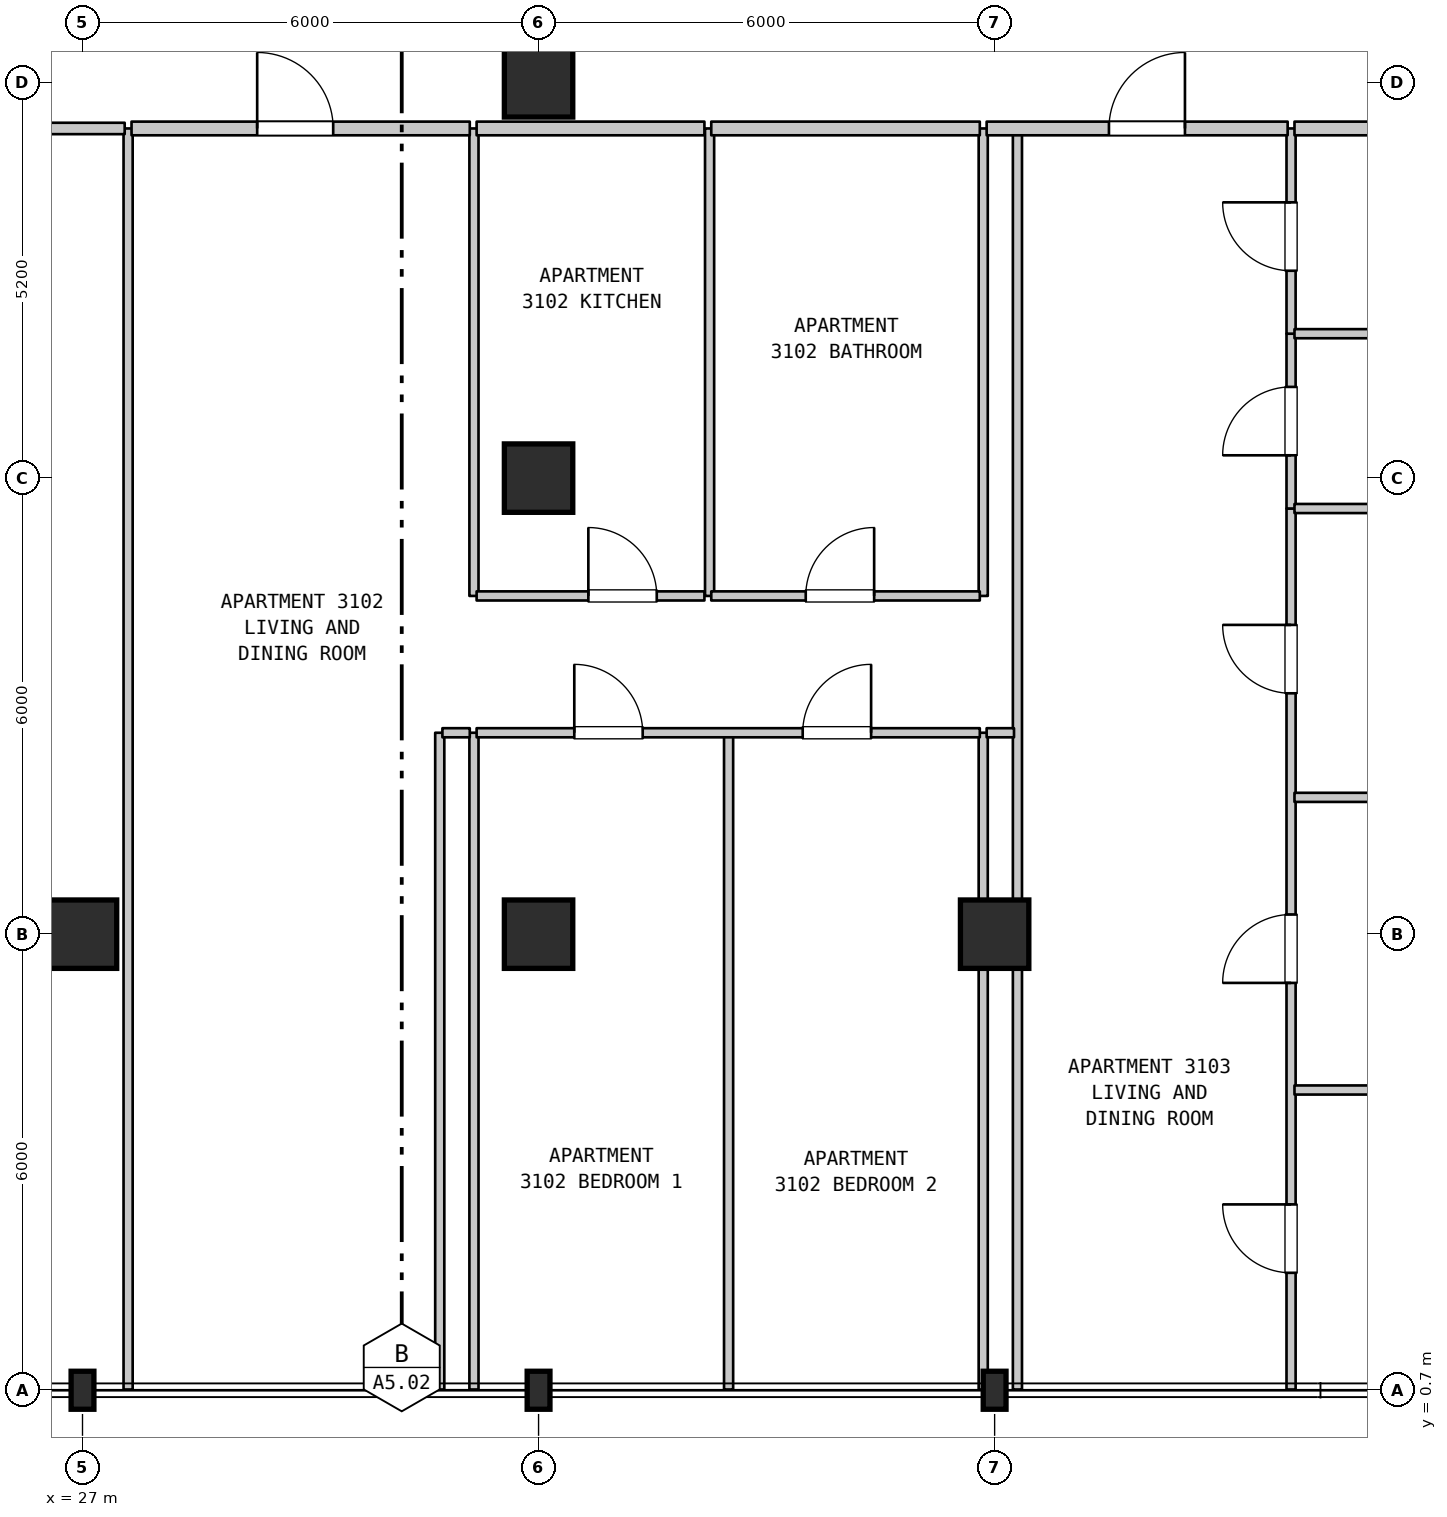
"""IFC4 building model, lengths in metres.
Left out: names, types, materials, properties, quantities, classifications, styles, units other than length and angle.
Written with IfcOpenShell. Run it as: python <this file> out.ifc"""

import sys

from ifc_helpers import new_model, si_unit, direction, frame, frame_2d, origin, origin_2d, place, context, subcontext, project, spatial, rectangle, i_section, extrude, element, fill, save


model = new_model("IFC4")
c1 = context("Model", 3, precision=1e-05, world=origin(), true_north=direction((0.0, 1.0)))
c2 = subcontext(c1, "Body", "Model", "MODEL_VIEW")
j1 = project(units=[si_unit("LENGTHUNIT", "METRE"), si_unit("PLANEANGLEUNIT", "RADIAN")], contexts=[c1])
p1 = place(None, origin())
s1 = spatial("IfcSite", under=j1, at=p1, CompositionType="ELEMENT")
p2 = place(p1, origin())
s2 = spatial("IfcBuilding", under=s1, at=p2, CompositionType="ELEMENT")
p3 = place(p2, frame((0.0, 0.0, 129.8)))
s3 = spatial("IfcBuildingStorey", under=s2, at=p3, CompositionType="ELEMENT", Elevation=129.8)
p4 = place(p3, frame((27.0, 0.7, 0.0), z_axis=(0.0, 0.0, 1.0), x_axis=(1.0, 0.0, 0.0)))
e1 = element("IfcColumn", 1, at=p4, inside=s3, PredefinedType="COLUMN", context=c2, shape_type="SweptSolid", body=[
    extrude(i_section(OverallWidth=0.3, OverallDepth=0.5, WebThickness=0.014, FlangeThickness=0.028, FilletRadius=0.027, at=origin_2d()), origin(), (0.0, 0.0, 1.0), 3.7),
])
p5 = place(p3, frame((27.0, 6.7, 0.0), z_axis=(0.0, 0.0, 1.0), x_axis=(1.0, 0.0, 0.0)))
e2 = element("IfcColumn", 2, at=p5, inside=s3, PredefinedType="COLUMN", context=c2, shape_type="SweptSolid", body=[
    extrude(rectangle(XDim=0.9, YDim=0.9, at=origin_2d()), origin(), (0.0, 0.0, 1.0), 3.7),
])
p6 = place(p3, frame((33.0, 0.7, 0.0), z_axis=(0.0, 0.0, 1.0), x_axis=(1.0, 0.0, 0.0)))
e3 = element("IfcColumn", 3, at=p6, inside=s3, PredefinedType="COLUMN", context=c2, shape_type="SweptSolid", body=[
    extrude(i_section(OverallWidth=0.3, OverallDepth=0.5, WebThickness=0.014, FlangeThickness=0.028, FilletRadius=0.027, at=origin_2d()), origin(), (0.0, 0.0, 1.0), 3.7),
])
for number, where, z_axis, x_axis in (
    (4, (33.0, 6.7, 0.0), (0.0, 0.0, 1.0), (1.0, 0.0, 0.0)),
    (5, (33.0, 12.7, 0.0), (0.0, 0.0, 1.0), (1.0, 0.0, 0.0)),
    (6, (33.0, 17.9, 0.0), (0.0, 0.0, 1.0), (1.0, 0.0, 0.0)),
):
    element("IfcColumn", number, at=place(p3, frame(where, z_axis=z_axis, x_axis=x_axis)), inside=s3, PredefinedType="COLUMN", context=c2, shape_type="SweptSolid", body=[
        extrude(rectangle(XDim=0.9, YDim=0.9, at=origin_2d()), origin(), (0.0, 0.0, 1.0), 3.7),
    ])
p7 = place(p3, frame((39.0, 0.7, 0.0), z_axis=(0.0, 0.0, 1.0), x_axis=(1.0, 0.0, 0.0)))
e7 = element("IfcColumn", 7, at=p7, inside=s3, PredefinedType="COLUMN", context=c2, shape_type="SweptSolid", body=[
    extrude(i_section(OverallWidth=0.3, OverallDepth=0.5, WebThickness=0.014, FlangeThickness=0.028, FilletRadius=0.027, at=origin_2d()), origin(), (0.0, 0.0, 1.0), 3.7),
])
p8 = place(p3, frame((39.0, 6.7, 0.0), z_axis=(0.0, 0.0, 1.0), x_axis=(1.0, 0.0, 0.0)))
e8 = element("IfcColumn", 8, at=p8, inside=s3, PredefinedType="COLUMN", context=c2, shape_type="SweptSolid", body=[
    extrude(rectangle(XDim=0.9, YDim=0.9, at=origin_2d()), origin(), (0.0, 0.0, 1.0), 3.7),
])
p9 = place(p3, frame((27.6, 0.71, 0.0), z_axis=(0.0, 0.0, 1.0), x_axis=(0.0, 1.0, 0.0)))
e9 = element("IfcWall", 9, at=p9, inside=s3, PredefinedType="PARTITIONING", context=c2, shape_type="SweptSolid", body=[
    extrude(rectangle(XDim=16.59, YDim=0.12, at=frame_2d((8.295, 0.0))), origin(), (0.0, 0.0, 1.0), 3.385),
])
for number, where, z_axis, x_axis in (
    (10, (31.7, 0.71, 0.0), (0.0, 0.0, 1.0), (0.0, 1.0, 0.0)),
    (11, (32.15, 0.71, 0.0), (0.0, 0.0, 1.0), (0.0, 1.0, 0.0)),
):
    element("IfcWall", number, at=place(p3, frame(where, z_axis=z_axis, x_axis=x_axis)), inside=s3, PredefinedType="PARTITIONING", context=c2, shape_type="SweptSolid", body=[
        extrude(rectangle(XDim=8.64, YDim=0.12, at=frame_2d((4.32, 0.0))), origin(), (0.0, 0.0, 1.0), 3.385),
    ])
for number, where, z_axis, x_axis in (
    (12, (32.15, 11.15, 0.0), (0.0, 0.0, 1.0), (0.0, 1.0, 0.0)),
    (13, (35.25, 11.15, 0.0), (0.0, 0.0, 1.0), (0.0, 1.0, 0.0)),
):
    element("IfcWall", number, at=place(p3, frame(where, z_axis=z_axis, x_axis=x_axis)), inside=s3, PredefinedType="PARTITIONING", context=c2, shape_type="SweptSolid", body=[
        extrude(rectangle(XDim=6.15, YDim=0.12, at=frame_2d((3.075, 0.0))), origin(), (0.0, 0.0, 1.0), 3.385),
    ])
for number, where, z_axis, x_axis in (
    (14, (35.5, 0.71, 0.0), (0.0, 0.0, 1.0), (0.0, 1.0, 0.0)),
    (15, (38.85, 0.71, 0.0), (0.0, 0.0, 1.0), (0.0, 1.0, 0.0)),
):
    element("IfcWall", number, at=place(p3, frame(where, z_axis=z_axis, x_axis=x_axis)), inside=s3, PredefinedType="PARTITIONING", context=c2, shape_type="SweptSolid", body=[
        extrude(rectangle(XDim=8.64, YDim=0.12, at=frame_2d((4.32, 0.0))), origin(), (0.0, 0.0, 1.0), 3.385),
    ])
p10 = place(p3, frame((38.85, 11.15, 0.0), z_axis=(0.0, 0.0, 1.0), x_axis=(0.0, 1.0, 0.0)))
e16 = element("IfcWall", 16, at=p10, inside=s3, PredefinedType="PARTITIONING", context=c2, shape_type="SweptSolid", body=[
    extrude(rectangle(XDim=6.15, YDim=0.12, at=frame_2d((3.075, 0.0))), origin(), (0.0, 0.0, 1.0), 3.385),
])
p11 = place(p3, frame((39.3, 0.71, 0.0), z_axis=(0.0, 0.0, 1.0), x_axis=(0.0, 1.0, 0.0)))
e17 = element("IfcWall", 17, at=p11, inside=s3, PredefinedType="PARTITIONING", context=c2, shape_type="SweptSolid", body=[
    extrude(rectangle(XDim=16.59, YDim=0.12, at=frame_2d((8.295, 0.0))), origin(), (0.0, 0.0, 1.0), 3.385),
])
p12 = place(p3, frame((42.9, 0.71, 0.0), z_axis=(0.0, 0.0, 1.0), x_axis=(0.0, 1.0, 0.0)))
e18 = element("IfcWall", 18, at=p12, inside=s3, PredefinedType="PARTITIONING", context=c2, shape_type="SweptSolid", body=[
    extrude(rectangle(XDim=11.59, YDim=0.12, at=frame_2d((5.795, 0.0))), origin(), (0.0, 0.0, 1.0), 3.385),
])
p13 = place(p12, frame((1.535, 0.0, 0.0)))
e19 = element("IfcOpeningElement", 19, at=p13, cuts=e18, PredefinedType="OPENING", context=c2, shape_type="SweptSolid", body=[
    extrude(rectangle(XDim=0.9, YDim=2.15, at=frame_2d((0.45, 1.075))), frame((0.0, 0.07, 0.0), z_axis=(0.0, -1.0, 0.0), x_axis=(1.0, 0.0, 0.0)), (0.0, 0.0, 1.0), 0.14),
])
p14 = place(p12, frame((5.349, 0.0, 0.0)))
e20 = element("IfcOpeningElement", 20, at=p14, cuts=e18, PredefinedType="OPENING", context=c2, shape_type="SweptSolid", body=[
    extrude(rectangle(XDim=0.9, YDim=2.15, at=frame_2d((0.45, 1.075))), frame((0.0, 0.07, 0.0), z_axis=(0.0, -1.0, 0.0), x_axis=(1.0, 0.0, 0.0)), (0.0, 0.0, 1.0), 0.14),
])
p15 = place(p12, frame((9.159, 0.0, 0.0)))
e21 = element("IfcOpeningElement", 21, at=p15, cuts=e18, PredefinedType="OPENING", context=c2, shape_type="SweptSolid", body=[
    extrude(rectangle(XDim=0.9, YDim=2.15, at=frame_2d((0.45, 1.075))), frame((0.0, 0.07, 0.0), z_axis=(0.0, -1.0, 0.0), x_axis=(1.0, 0.0, 0.0)), (0.0, 0.0, 1.0), 0.14),
])
p16 = place(p3, frame((42.9, 12.3, 0.0), z_axis=(0.0, 0.0, 1.0), x_axis=(0.0, 1.0, 0.0)))
e22 = element("IfcWall", 22, at=p16, inside=s3, PredefinedType="PARTITIONING", context=c2, shape_type="SweptSolid", body=[
    extrude(rectangle(XDim=2.3, YDim=0.12, at=frame_2d((1.15, 0.0))), origin(), (0.0, 0.0, 1.0), 3.385),
])
p17 = place(p16, frame((0.7, 0.0, 0.0)))
e23 = element("IfcOpeningElement", 23, at=p17, cuts=e22, PredefinedType="OPENING", context=c2, shape_type="SweptSolid", body=[
    extrude(rectangle(XDim=0.9, YDim=2.15, at=frame_2d((0.45, 1.075))), frame((0.0, 0.07, 0.0), z_axis=(0.0, -1.0, 0.0), x_axis=(1.0, 0.0, 0.0)), (0.0, 0.0, 1.0), 0.14),
])
p18 = place(p3, frame((42.9, 14.6, 0.0), z_axis=(0.0, 0.0, 1.0), x_axis=(0.0, 1.0, 0.0)))
e24 = element("IfcWall", 24, at=p18, inside=s3, PredefinedType="PARTITIONING", context=c2, shape_type="SweptSolid", body=[
    extrude(rectangle(XDim=2.7, YDim=0.12, at=frame_2d((1.35, 0.0))), origin(), (0.0, 0.0, 1.0), 3.385),
])
p19 = place(p18, frame((0.828, 0.0, 0.0)))
e25 = element("IfcOpeningElement", 25, at=p19, cuts=e24, PredefinedType="OPENING", context=c2, shape_type="SweptSolid", body=[
    extrude(rectangle(XDim=0.9, YDim=2.1, at=frame_2d((0.45, 1.05))), frame((0.0, 0.07, 0.0), z_axis=(0.0, -1.0, 0.0), x_axis=(1.0, 0.0, 0.0)), (0.0, 0.0, 1.0), 0.14),
])
for number, where, z_axis, x_axis in (
    (26, (42.945, 4.65, 0.0), (0.0, 0.0, 1.0), (1.0, 0.0, 0.0)),
    (27, (42.945, 8.5, 0.0), (0.0, 0.0, 1.0), (1.0, 0.0, 0.0)),
):
    element("IfcWall", number, at=place(p3, frame(where, z_axis=z_axis, x_axis=x_axis)), inside=s3, PredefinedType="PARTITIONING", context=c2, shape_type="SweptSolid", body=[
        extrude(rectangle(XDim=6.25, YDim=0.12, at=frame_2d((3.125, 0.0))), origin(), (0.0, 0.0, 1.0), 3.385),
    ])
p20 = place(p3, frame((31.735, 9.35, 0.0), z_axis=(0.0, 0.0, 1.0), x_axis=(1.0, 0.0, 0.0)))
e28 = element("IfcWall", 28, at=p20, inside=s3, PredefinedType="PARTITIONING", context=c2, shape_type="SweptSolid", body=[
    extrude(rectangle(XDim=0.36, YDim=0.12, at=frame_2d((0.18, 0.0))), origin(), (0.0, 0.0, 1.0), 3.385),
])
p21 = place(p3, frame((32.185, 9.35, 0.0), z_axis=(0.0, 0.0, 1.0), x_axis=(1.0, 0.0, 0.0)))
e29 = element("IfcWall", 29, at=p21, inside=s3, PredefinedType="PARTITIONING", context=c2, shape_type="SweptSolid", body=[
    extrude(rectangle(XDim=6.62, YDim=0.12, at=frame_2d((3.31, 0.0))), origin(), (0.0, 0.0, 1.0), 3.385),
])
p22 = place(p21, frame((1.285, 0.0, 0.0)))
e30 = element("IfcOpeningElement", 30, at=p22, cuts=e29, PredefinedType="OPENING", context=c2, shape_type="SweptSolid", body=[
    extrude(rectangle(XDim=0.9, YDim=2.15, at=frame_2d((0.45, 1.075))), frame((0.0, 0.07, 0.0), z_axis=(0.0, -1.0, 0.0), x_axis=(1.0, 0.0, 0.0)), (0.0, 0.0, 1.0), 0.14),
])
p23 = place(p21, frame((4.29, 0.0, 0.0)))
e31 = element("IfcOpeningElement", 31, at=p23, cuts=e29, PredefinedType="OPENING", context=c2, shape_type="SweptSolid", body=[
    extrude(rectangle(XDim=0.9, YDim=2.15, at=frame_2d((0.45, 1.075))), frame((0.0, 0.07, 0.0), z_axis=(0.0, -1.0, 0.0), x_axis=(1.0, 0.0, 0.0)), (0.0, 0.0, 1.0), 0.14),
])
p24 = place(p3, frame((38.895, 9.35, 0.0), z_axis=(0.0, 0.0, 1.0), x_axis=(1.0, 0.0, 0.0)))
e32 = element("IfcWall", 32, at=p24, inside=s3, PredefinedType="PARTITIONING", context=c2, shape_type="SweptSolid", body=[
    extrude(rectangle(XDim=0.36, YDim=0.12, at=frame_2d((0.18, 0.0))), origin(), (0.0, 0.0, 1.0), 3.385),
])
p25 = place(p3, frame((32.185, 11.15, 0.0), z_axis=(0.0, 0.0, 1.0), x_axis=(1.0, 0.0, 0.0)))
e33 = element("IfcWall", 33, at=p25, inside=s3, PredefinedType="PARTITIONING", context=c2, shape_type="SweptSolid", body=[
    extrude(rectangle(XDim=2.997, YDim=0.12, at=frame_2d((1.499, 0.0))), origin(), (0.0, 0.0, 1.0), 3.385),
])
p26 = place(p25, frame((1.47, 0.0, 0.0)))
e34 = element("IfcOpeningElement", 34, at=p26, cuts=e33, PredefinedType="OPENING", context=c2, shape_type="SweptSolid", body=[
    extrude(rectangle(XDim=0.9, YDim=2.15, at=frame_2d((0.45, 1.075))), frame((0.0, 0.07, 0.0), z_axis=(0.0, -1.0, 0.0), x_axis=(1.0, 0.0, 0.0)), (0.0, 0.0, 1.0), 0.14),
])
p27 = place(p3, frame((35.272, 11.15, 0.0), z_axis=(0.0, 0.0, 1.0), x_axis=(1.0, 0.0, 0.0)))
e35 = element("IfcWall", 35, at=p27, inside=s3, PredefinedType="PARTITIONING", context=c2, shape_type="SweptSolid", body=[
    extrude(rectangle(XDim=3.533, YDim=0.12, at=frame_2d((1.767, 0.0))), origin(), (0.0, 0.0, 1.0), 3.385),
])
p28 = place(p27, frame((1.243, 0.0, 0.0)))
e36 = element("IfcOpeningElement", 36, at=p28, cuts=e35, PredefinedType="OPENING", context=c2, shape_type="SweptSolid", body=[
    extrude(rectangle(XDim=0.9, YDim=2.1, at=frame_2d((0.45, 1.05))), frame((0.0, 0.07, 0.0), z_axis=(0.0, -1.0, 0.0), x_axis=(1.0, 0.0, 0.0)), (0.0, 0.0, 1.0), 0.14),
])
for number, where, z_axis, x_axis in (
    (37, (42.945, 12.3, 0.0), (0.0, 0.0, 1.0), (1.0, 0.0, 0.0)),
    (38, (42.945, 14.6, 0.0), (0.0, 0.0, 1.0), (1.0, 0.0, 0.0)),
):
    element("IfcWall", number, at=place(p3, frame(where, z_axis=z_axis, x_axis=x_axis)), inside=s3, PredefinedType="PARTITIONING", context=c2, shape_type="SweptSolid", body=[
        extrude(rectangle(XDim=6.25, YDim=0.12, at=frame_2d((3.125, 0.0))), origin(), (0.0, 0.0, 1.0), 3.385),
    ])
p29 = place(p3, frame((21.045, 17.3, 0.0), z_axis=(0.0, 0.0, 1.0), x_axis=(1.0, 0.0, 0.0)))
e39 = element("IfcWall", 39, at=p29, inside=s3, PredefinedType="STANDARD", context=c2, shape_type="SweptSolid", body=[
    extrude(rectangle(XDim=6.51, YDim=0.15, at=frame_2d((3.255, 0.0))), origin(), (0.0, 0.0, 1.0), 3.385),
])
p30 = place(p29, frame((2.755, 0.0, 0.0)))
e40 = element("IfcOpeningElement", 40, at=p30, cuts=e39, PredefinedType="OPENING", context=c2, shape_type="SweptSolid", body=[
    extrude(rectangle(XDim=1.0, YDim=2.15, at=frame_2d((0.5, 1.075))), frame((0.0, 0.085, 0.0), z_axis=(0.0, -1.0, 0.0), x_axis=(1.0, 0.0, 0.0)), (0.0, 0.0, 1.0), 0.17),
])
p31 = place(p3, frame((27.645, 17.3, 0.0), z_axis=(0.0, 0.0, 1.0), x_axis=(1.0, 0.0, 0.0)))
e41 = element("IfcWall", 41, at=p31, inside=s3, PredefinedType="STANDARD", context=c2, shape_type="SweptSolid", body=[
    extrude(rectangle(XDim=4.45, YDim=0.18, at=frame_2d((2.225, 0.0))), origin(), (0.0, 0.0, 1.0), 3.385),
])
p32 = place(p31, frame((1.653, 0.0, 0.0)))
e42 = element("IfcOpeningElement", 42, at=p32, cuts=e41, PredefinedType="OPENING", context=c2, shape_type="SweptSolid", body=[
    extrude(rectangle(XDim=1.0, YDim=2.15, at=frame_2d((0.5, 1.075))), frame((0.0, 0.1, 0.0), z_axis=(0.0, -1.0, 0.0), x_axis=(1.0, 0.0, 0.0)), (0.0, 0.0, 1.0), 0.2),
])
p33 = place(p3, frame((32.185, 17.3, 0.0), z_axis=(0.0, 0.0, 1.0), x_axis=(1.0, 0.0, 0.0)))
e43 = element("IfcWall", 43, at=p33, inside=s3, PredefinedType="STANDARD", context=c2, shape_type="SweptSolid", body=[
    extrude(rectangle(XDim=2.997, YDim=0.18, at=frame_2d((1.499, 0.0))), origin(), (0.0, 0.0, 1.0), 3.385),
])
p34 = place(p3, frame((35.272, 17.3, 0.0), z_axis=(0.0, 0.0, 1.0), x_axis=(1.0, 0.0, 0.0)))
e44 = element("IfcWall", 44, at=p34, inside=s3, PredefinedType="STANDARD", context=c2, shape_type="SweptSolid", body=[
    extrude(rectangle(XDim=3.533, YDim=0.18, at=frame_2d((1.767, 0.0))), origin(), (0.0, 0.0, 1.0), 3.385),
])
p35 = place(p3, frame((38.895, 17.3, 0.0), z_axis=(0.0, 0.0, 1.0), x_axis=(1.0, 0.0, 0.0)))
e45 = element("IfcWall", 45, at=p35, inside=s3, PredefinedType="STANDARD", context=c2, shape_type="SweptSolid", body=[
    extrude(rectangle(XDim=3.96, YDim=0.18, at=frame_2d((1.98, 0.0))), origin(), (0.0, 0.0, 1.0), 3.385),
])
p36 = place(p35, frame((1.609, 0.0, 0.0)))
e46 = element("IfcOpeningElement", 46, at=p36, cuts=e45, PredefinedType="OPENING", context=c2, shape_type="SweptSolid", body=[
    extrude(rectangle(XDim=1.0, YDim=2.15, at=frame_2d((0.5, 1.075))), frame((0.0, 0.1, 0.0), z_axis=(0.0, -1.0, 0.0), x_axis=(1.0, 0.0, 0.0)), (0.0, 0.0, 1.0), 0.2),
])
p37 = place(p3, frame((42.945, 17.3, 0.0), z_axis=(0.0, 0.0, 1.0), x_axis=(1.0, 0.0, 0.0)))
e47 = element("IfcWall", 47, at=p37, inside=s3, PredefinedType="STANDARD", context=c2, shape_type="SweptSolid", body=[
    extrude(rectangle(XDim=6.25, YDim=0.18, at=frame_2d((3.125, 0.0))), origin(), (0.0, 0.0, 1.0), 3.385),
])
p38 = place(p13, origin())
e48 = element("IfcDoor", 48, at=p38, inside=s3, OperationType="SINGLE_SWING_RIGHT", PredefinedType="DOOR", context=c2, shape_type="SweptSolid", body=[
    extrude(rectangle(XDim=0.9, YDim=2.15, at=frame_2d((0.45, 1.075))), frame((0.0, 0.025, 0.0), z_axis=(0.0, -1.0, 0.0), x_axis=(1.0, 0.0, 0.0)), (0.0, 0.0, 1.0), 0.05),
])
fill(e19, e48)
p39 = place(p14, origin())
e49 = element("IfcDoor", 49, at=p39, inside=s3, OperationType="SINGLE_SWING_LEFT", PredefinedType="DOOR", context=c2, shape_type="SweptSolid", body=[
    extrude(rectangle(XDim=0.9, YDim=2.15, at=frame_2d((0.45, 1.075))), frame((0.0, 0.025, 0.0), z_axis=(0.0, -1.0, 0.0), x_axis=(1.0, 0.0, 0.0)), (0.0, 0.0, 1.0), 0.05),
])
fill(e20, e49)
p40 = place(p15, origin())
e50 = element("IfcDoor", 50, at=p40, inside=s3, OperationType="SINGLE_SWING_RIGHT", PredefinedType="DOOR", context=c2, shape_type="SweptSolid", body=[
    extrude(rectangle(XDim=0.9, YDim=2.15, at=frame_2d((0.45, 1.075))), frame((0.0, 0.025, 0.0), z_axis=(0.0, -1.0, 0.0), x_axis=(1.0, 0.0, 0.0)), (0.0, 0.0, 1.0), 0.05),
])
fill(e21, e50)
p41 = place(p17, origin())
e51 = element("IfcDoor", 51, at=p41, inside=s3, OperationType="SINGLE_SWING_LEFT", PredefinedType="DOOR", context=c2, shape_type="SweptSolid", body=[
    extrude(rectangle(XDim=0.9, YDim=2.15, at=frame_2d((0.45, 1.075))), frame((0.0, 0.025, 0.0), z_axis=(0.0, -1.0, 0.0), x_axis=(1.0, 0.0, 0.0)), (0.0, 0.0, 1.0), 0.05),
])
fill(e23, e51)
p42 = place(p19, origin())
e52 = element("IfcDoor", 52, at=p42, inside=s3, OperationType="SINGLE_SWING_RIGHT", PredefinedType="DOOR", context=c2, shape_type="SweptSolid", body=[
    extrude(rectangle(XDim=0.9, YDim=2.1, at=frame_2d((0.45, 1.05))), frame((0.0, 0.025, 0.0), z_axis=(0.0, -1.0, 0.0), x_axis=(1.0, 0.0, 0.0)), (0.0, 0.0, 1.0), 0.05),
])
fill(e25, e52)
p43 = place(p22, origin())
e53 = element("IfcDoor", 53, at=p43, inside=s3, OperationType="SINGLE_SWING_LEFT", PredefinedType="DOOR", context=c2, shape_type="SweptSolid", body=[
    extrude(rectangle(XDim=0.9, YDim=2.15, at=frame_2d((0.45, 1.075))), frame((0.0, 0.025, 0.0), z_axis=(0.0, -1.0, 0.0), x_axis=(1.0, 0.0, 0.0)), (0.0, 0.0, 1.0), 0.05),
])
fill(e30, e53)
p44 = place(p23, origin())
e54 = element("IfcDoor", 54, at=p44, inside=s3, OperationType="SINGLE_SWING_RIGHT", PredefinedType="DOOR", context=c2, shape_type="SweptSolid", body=[
    extrude(rectangle(XDim=0.9, YDim=2.15, at=frame_2d((0.45, 1.075))), frame((0.0, 0.025, 0.0), z_axis=(0.0, -1.0, 0.0), x_axis=(1.0, 0.0, 0.0)), (0.0, 0.0, 1.0), 0.05),
])
fill(e31, e54)
p45 = place(p26, origin())
e55 = element("IfcDoor", 55, at=p45, inside=s3, OperationType="SINGLE_SWING_LEFT", PredefinedType="DOOR", context=c2, shape_type="SweptSolid", body=[
    extrude(rectangle(XDim=0.9, YDim=2.15, at=frame_2d((0.45, 1.075))), frame((0.0, 0.025, 0.0), z_axis=(0.0, -1.0, 0.0), x_axis=(1.0, 0.0, 0.0)), (0.0, 0.0, 1.0), 0.05),
])
fill(e34, e55)
p46 = place(p28, origin())
e56 = element("IfcDoor", 56, at=p46, inside=s3, OperationType="SINGLE_SWING_RIGHT", PredefinedType="DOOR", context=c2, shape_type="SweptSolid", body=[
    extrude(rectangle(XDim=0.9, YDim=2.1, at=frame_2d((0.45, 1.05))), frame((0.0, 0.025, 0.0), z_axis=(0.0, -1.0, 0.0), x_axis=(1.0, 0.0, 0.0)), (0.0, 0.0, 1.0), 0.05),
])
fill(e36, e56)
p47 = place(p32, origin())
e57 = element("IfcDoor", 57, at=p47, inside=s3, OperationType="SINGLE_SWING_LEFT", PredefinedType="DOOR", context=c2, shape_type="SweptSolid", body=[
    extrude(rectangle(XDim=1.0, YDim=2.15, at=frame_2d((0.5, 1.075))), frame((0.0, 0.025, 0.0), z_axis=(0.0, -1.0, 0.0), x_axis=(1.0, 0.0, 0.0)), (0.0, 0.0, 1.0), 0.05),
])
fill(e42, e57)
p48 = place(p36, origin())
e58 = element("IfcDoor", 58, at=p48, inside=s3, OperationType="SINGLE_SWING_RIGHT", PredefinedType="DOOR", context=c2, shape_type="SweptSolid", body=[
    extrude(rectangle(XDim=1.0, YDim=2.15, at=frame_2d((0.5, 1.075))), frame((0.0, 0.025, 0.0), z_axis=(0.0, -1.0, 0.0), x_axis=(1.0, 0.0, 0.0)), (0.0, 0.0, 1.0), 0.05),
])
fill(e46, e58)
save(model, sys.argv[1])
